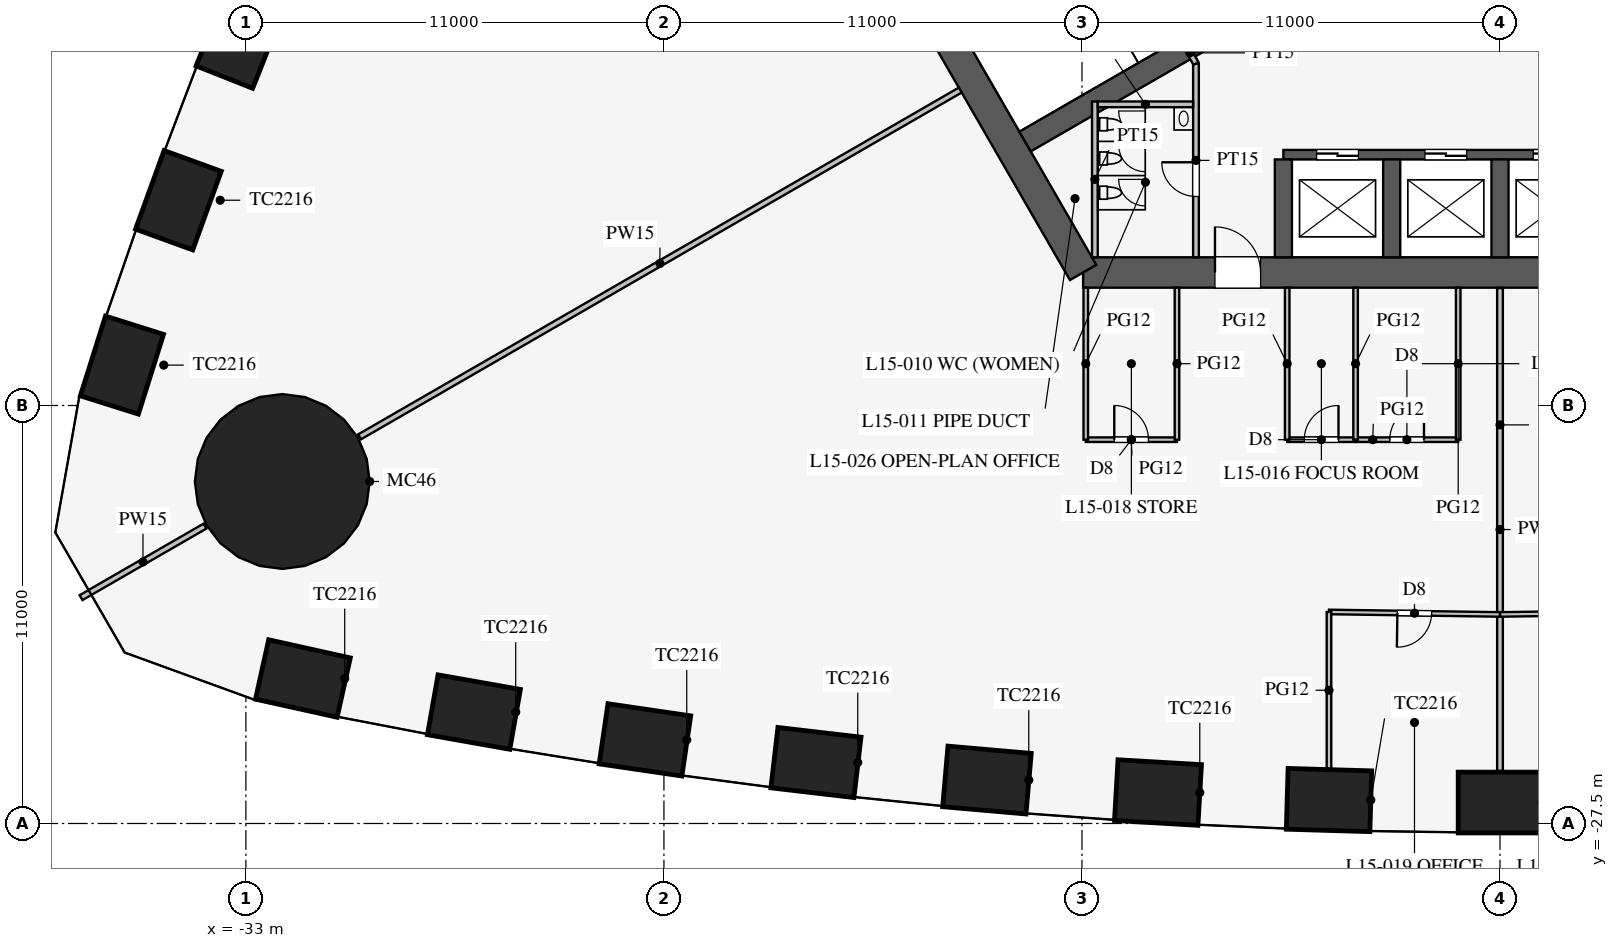
"""IFC4 building model, lengths in metres.
Left out: names, types, materials, properties, quantities, classifications, styles, units other than length and angle.
Written with IfcOpenShell. Run it as: python <this file> out.ifc"""

import sys

from ifc_helpers import new_model, si_unit, direction, frame, frame_2d, origin, origin_2d, place, context, subcontext, project, spatial, rectangle, circle, extrude, element, fill, save


model = new_model("IFC4")
c1 = context("Model", 3, precision=1e-05, world=origin(), true_north=direction((0.0, 1.0)))
c2 = subcontext(c1, "Body", "Model", "MODEL_VIEW")
j1 = project(units=[si_unit("LENGTHUNIT", "METRE"), si_unit("PLANEANGLEUNIT", "RADIAN")], contexts=[c1])
p1 = place(None, origin())
s1 = spatial("IfcSite", under=j1, at=p1, CompositionType="ELEMENT")
p2 = place(p1, origin())
s2 = spatial("IfcBuilding", under=s1, at=p2, CompositionType="ELEMENT")
p3 = place(p2, frame((0.0, 0.0, 66.9)))
s3 = spatial("IfcBuildingStorey", under=s2, at=p3, CompositionType="ELEMENT", Elevation=66.9)
for number, where, z_axis, x_axis in (
    (1, (-31.5, -23.685, 0.0), (0.0, 0.0, 1.0), (0.976, -0.217, 0.0)),
    (2, (-27.0, -24.568, 0.0), (0.0, 0.0, 1.0), (0.985, -0.174, 0.0)),
    (3, (-22.5, -25.299, 0.0), (0.0, 0.0, 1.0), (0.989, -0.145, 0.0)),
    (4, (-18.0, -25.895, 0.0), (0.0, 0.0, 1.0), (0.993, -0.116, 0.0)),
    (5, (-13.5, -26.357, 0.0), (0.0, 0.0, 1.0), (0.996, -0.087, 0.0)),
    (6, (-9.0, -26.686, 0.0), (0.0, 0.0, 1.0), (0.998, -0.058, 0.0)),
    (7, (-4.5, -26.883, 0.0), (0.0, 0.0, 1.0), (1.0, -0.029, 0.0)),
    (8, (0.0, -26.949, 0.0), (0.0, 0.0, 1.0), (1.0, 0.0, 0.0)),
    (9, (-33.16, -6.836, 0.0), (0.0, 0.0, 1.0), (-0.369, -0.929, 0.0)),
    (10, (-34.776, -11.099, 0.0), (0.0, 0.0, 1.0), (-0.342, -0.94, 0.0)),
    (11, (-36.262, -15.438, 0.0), (0.0, 0.0, 1.0), (-0.3, -0.954, 0.0)),
):
    element("IfcColumn", number, at=place(p3, frame(where, z_axis=z_axis, x_axis=x_axis)), inside=s3, PredefinedType="COLUMN", context=c2, shape_type="SweptSolid", body=[
        extrude(rectangle(XDim=2.2, YDim=1.6, at=origin_2d()), origin(), (0.0, 0.0, 1.0), 4.2),
    ])
p4 = place(p3, frame((-32.043, -18.5, 0.0), z_axis=(0.0, 0.0, 1.0), x_axis=(1.0, 0.0, 0.0)))
e12 = element("IfcColumn", 12, at=p4, inside=s3, PredefinedType="COLUMN", context=c2, shape_type="SweptSolid", body=[
    extrude(circle(Radius=2.3, at=origin_2d()), origin(), (0.0, 0.0, 1.0), 4.2),
])
p5 = place(p3, frame((-10.97, -13.0, 0.0), z_axis=(0.0, 0.0, 1.0), x_axis=(1.0, 0.0, 0.0)))
e13 = element("IfcWall", 13, at=p5, inside=s3, PredefinedType="SHEAR", context=c2, shape_type="SweptSolid", body=[
    extrude(rectangle(XDim=21.939, YDim=0.8, at=frame_2d((10.97, 0.0))), origin(), (0.0, 0.0, 1.0), 4.2),
])
p6 = place(p5, frame((17.27, 0.0, 0.0)))
e14 = element("IfcOpeningElement", 14, at=p6, cuts=e13, PredefinedType="OPENING", context=c2, shape_type="SweptSolid", body=[
    extrude(rectangle(XDim=1.2, YDim=2.1, at=frame_2d((0.6, 1.05))), frame((0.0, 0.41, 0.0), z_axis=(0.0, -1.0, 0.0), x_axis=(1.0, 0.0, 0.0)), (0.0, 0.0, 1.0), 0.82),
])
p7 = place(p5, frame((3.47, 0.0, 0.0)))
e15 = element("IfcOpeningElement", 15, at=p7, cuts=e13, PredefinedType="OPENING", context=c2, shape_type="SweptSolid", body=[
    extrude(rectangle(XDim=1.2, YDim=2.1, at=frame_2d((0.6, 1.05))), frame((0.0, 0.41, 0.0), z_axis=(0.0, -1.0, 0.0), x_axis=(1.0, 0.0, 0.0)), (0.0, 0.0, 1.0), 0.82),
])
p8 = place(p3, frame((-16.743, -3.0, 0.0), z_axis=(0.0, 0.0, 1.0), x_axis=(0.499995765644, -0.866027848477, 0.0)))
e16 = element("IfcWall", 16, at=p8, inside=s3, PredefinedType="SHEAR", context=c2, shape_type="SweptSolid", body=[
    extrude(rectangle(XDim=11.547, YDim=0.8, at=frame_2d((5.773, 0.0))), origin(), (0.0, 0.0, 1.0), 4.2),
])
p9 = place(p3, frame((-5.7, -9.9, 0.0), z_axis=(0.0, 0.0, 1.0), x_axis=(1.0, 0.0, 0.0)))
e17 = element("IfcWall", 17, at=p9, inside=s3, PredefinedType="SHEAR", context=c2, shape_type="SweptSolid", body=[
    extrude(rectangle(XDim=11.4, YDim=0.25, at=frame_2d((5.7, 0.0))), origin(), (0.0, 0.0, 1.0), 4.2),
])
p10 = place(p9, frame((0.875, 0.0, 0.0)))
e18 = element("IfcOpeningElement", 18, at=p10, cuts=e17, PredefinedType="OPENING", context=c2, shape_type="SweptSolid", body=[
    extrude(rectangle(XDim=1.1, YDim=2.2, at=frame_2d((0.55, 1.1))), frame((0.0, 0.135, 0.0), z_axis=(0.0, -1.0, 0.0), x_axis=(1.0, 0.0, 0.0)), (0.0, 0.0, 1.0), 0.27),
])
p11 = place(p9, frame((3.725, 0.0, 0.0)))
e19 = element("IfcOpeningElement", 19, at=p11, cuts=e17, PredefinedType="OPENING", context=c2, shape_type="SweptSolid", body=[
    extrude(rectangle(XDim=1.1, YDim=2.2, at=frame_2d((0.55, 1.1))), frame((0.0, 0.135, 0.0), z_axis=(0.0, -1.0, 0.0), x_axis=(1.0, 0.0, 0.0)), (0.0, 0.0, 1.0), 0.27),
])
p12 = place(p9, frame((6.575, 0.0, 0.0)))
e20 = element("IfcOpeningElement", 20, at=p12, cuts=e17, PredefinedType="OPENING", context=c2, shape_type="SweptSolid", body=[
    extrude(rectangle(XDim=1.1, YDim=2.2, at=frame_2d((0.55, 1.1))), frame((0.0, 0.135, 0.0), z_axis=(0.0, -1.0, 0.0), x_axis=(1.0, 0.0, 0.0)), (0.0, 0.0, 1.0), 0.27),
])
p13 = place(p9, frame((9.425, 0.0, 0.0)))
e21 = element("IfcOpeningElement", 21, at=p13, cuts=e17, PredefinedType="OPENING", context=c2, shape_type="SweptSolid", body=[
    extrude(rectangle(XDim=1.1, YDim=2.2, at=frame_2d((0.55, 1.1))), frame((0.0, 0.135, 0.0), z_axis=(0.0, -1.0, 0.0), x_axis=(1.0, 0.0, 0.0)), (0.0, 0.0, 1.0), 0.27),
])
for number, where, z_axis, x_axis in (
    (22, (-5.7, -10.025, 0.0), (0.0, 0.0, 1.0), (0.0, -1.0, 0.0)),
    (23, (-2.85, -10.025, 0.0), (0.0, 0.0, 1.0), (0.0, -1.0, 0.0)),
    (24, (0.0, -10.025, 0.0), (0.0, 0.0, 1.0), (0.0, -1.0, 0.0)),
):
    element("IfcWall", number, at=place(p3, frame(where, z_axis=z_axis, x_axis=x_axis)), inside=s3, PredefinedType="SHEAR", context=c2, shape_type="SweptSolid", body=[
        extrude(rectangle(XDim=2.575, YDim=0.45, at=frame_2d((1.288, 0.0))), origin(), (0.0, 0.0, 1.0), 4.2),
    ])
p14 = place(p3, frame((-4.638, -5.016, 0.0), z_axis=(0.0, 0.0, 1.0), x_axis=(-0.866019375473, -0.500010441196, 0.0)))
e25 = element("IfcWall", 25, at=p14, inside=s3, PredefinedType="SHEAR", context=c2, shape_type="SweptSolid", body=[
    extrude(rectangle(XDim=9.075, YDim=0.6, at=frame_2d((4.538, 0.0))), origin(), (0.0, 0.0, 1.0), 4.2),
])
p15 = place(p3, frame((-8.0, -7.5, 0.0), z_axis=(0.0, 0.0, 1.0), x_axis=(0.0, -1.0, 0.0)))
e26 = element("IfcWall", 26, at=p15, inside=s3, PredefinedType="PARTITIONING", context=c2, shape_type="SweptSolid", body=[
    extrude(rectangle(XDim=5.1, YDim=0.15, at=frame_2d((2.55, 0.0))), origin(), (0.0, 0.0, 1.0), 4.0),
])
p16 = place(p15, frame((2.6, 0.0, 0.0)))
e27 = element("IfcOpeningElement", 27, at=p16, cuts=e26, PredefinedType="OPENING", context=c2, shape_type="SweptSolid", body=[
    extrude(rectangle(XDim=0.9, YDim=2.1, at=frame_2d((0.45, 1.05))), frame((0.0, 0.085, 0.0), z_axis=(0.0, -1.0, 0.0), x_axis=(1.0, 0.0, 0.0)), (0.0, 0.0, 1.0), 0.17),
])
p17 = place(p3, frame((-8.0, -7.5, 0.0), z_axis=(0.0, 0.0, 1.0), x_axis=(-0.499842556608, 0.866116284689, 0.0)))
e28 = element("IfcWall", 28, at=p17, inside=s3, PredefinedType="PARTITIONING", context=c2, shape_type="SweptSolid", body=[
    extrude(rectangle(XDim=0.645, YDim=0.15, at=frame_2d((0.323, 0.0))), origin(), (0.0, 0.0, 1.0), 4.0),
])
p18 = place(p3, frame((-10.66, -8.5, 0.0), z_axis=(0.0, 0.0, 1.0), x_axis=(0.0, -1.0, 0.0)))
e29 = element("IfcWall", 29, at=p18, inside=s3, PredefinedType="PARTITIONING", context=c2, shape_type="SweptSolid", body=[
    extrude(rectangle(XDim=4.1, YDim=0.15, at=frame_2d((2.05, 0.0))), origin(), (0.0, 0.0, 1.0), 4.0),
])
p19 = place(p3, frame((-8.075, -8.575, 0.0), z_axis=(0.0, 0.0, 1.0), x_axis=(-1.0, 0.0, 0.0)))
e30 = element("IfcWall", 30, at=p19, inside=s3, PredefinedType="PARTITIONING", context=c2, shape_type="SweptSolid", body=[
    extrude(rectangle(XDim=2.51, YDim=0.15, at=frame_2d((1.255, 0.0))), origin(), (0.0, 0.0, 1.0), 4.0),
])
p20 = place(p3, frame((-14.203, -8.2, 0.0), z_axis=(0.0, 0.0, 1.0), x_axis=(-0.866024965723, -0.500000758745, 0.0)))
e31 = element("IfcWall", 31, at=p20, inside=s3, PredefinedType="PARTITIONING", context=c2, shape_type="SweptSolid", body=[
    extrude(rectangle(XDim=18.25, YDim=0.15, at=frame_2d((9.125, 0.0))), origin(), (0.0, 0.0, 1.0), 2.3),
])
p21 = place(p3, frame((-34.078, -19.675, 0.0), z_axis=(0.0, 0.0, 1.0), x_axis=(-0.866019247219, -0.500010663332, 0.0)))
e32 = element("IfcWall", 32, at=p21, inside=s3, PredefinedType="PARTITIONING", context=c2, shape_type="SweptSolid", body=[
    extrude(rectangle(XDim=3.764, YDim=0.15, at=frame_2d((1.882, 0.0))), origin(), (0.0, 0.0, 1.0), 2.3),
])
p22 = place(p3, frame((0.0, -13.41, 0.0), z_axis=(0.0, 0.0, 1.0), x_axis=(0.0, -1.0, 0.0)))
e33 = element("IfcWall", 33, at=p22, inside=s3, PredefinedType="PARTITIONING", context=c2, shape_type="SweptSolid", body=[
    extrude(rectangle(XDim=12.709, YDim=0.15, at=frame_2d((6.354, 0.0))), origin(), (0.0, 0.0, 1.0), 2.8),
])
p23 = place(p3, frame((-10.9, -17.4, 0.0), z_axis=(0.0, 0.0, 1.0), x_axis=(1.0, 0.0, 0.0)))
e34 = element("IfcWall", 34, at=p23, inside=s3, PredefinedType="PARTITIONING", context=c2, shape_type="SweptSolid", body=[
    extrude(rectangle(XDim=2.4, YDim=0.12, at=frame_2d((1.2, 0.0))), origin(), (0.0, 0.0, 1.0), 2.9),
])
p24 = place(p23, frame((0.75, 0.0, 0.15)))
e35 = element("IfcOpeningElement", 35, at=p24, cuts=e34, PredefinedType="OPENING", context=c2, shape_type="SweptSolid", body=[
    extrude(rectangle(XDim=0.9, YDim=2.1, at=frame_2d((0.45, 1.05))), frame((0.0, 0.07, 0.0), z_axis=(0.0, -1.0, 0.0), x_axis=(1.0, 0.0, 0.0)), (0.0, 0.0, 1.0), 0.14),
])
p25 = place(p3, frame((-3.8, -17.4, 0.0), z_axis=(0.0, 0.0, 1.0), x_axis=(1.0, 0.0, 0.0)))
e36 = element("IfcWall", 36, at=p25, inside=s3, PredefinedType="PARTITIONING", context=c2, shape_type="SweptSolid", body=[
    extrude(rectangle(XDim=2.7, YDim=0.12, at=frame_2d((1.35, 0.0))), origin(), (0.0, 0.0, 1.0), 2.9),
])
p26 = place(p25, frame((0.9, 0.0, 0.15)))
e37 = element("IfcOpeningElement", 37, at=p26, cuts=e36, PredefinedType="OPENING", context=c2, shape_type="SweptSolid", body=[
    extrude(rectangle(XDim=0.9, YDim=2.1, at=frame_2d((0.45, 1.05))), frame((0.0, 0.07, 0.0), z_axis=(0.0, -1.0, 0.0), x_axis=(1.0, 0.0, 0.0)), (0.0, 0.0, 1.0), 0.14),
])
p27 = place(p3, frame((-5.6, -17.4, 0.0), z_axis=(0.0, 0.0, 1.0), x_axis=(1.0, 0.0, 0.0)))
e38 = element("IfcWall", 38, at=p27, inside=s3, PredefinedType="PARTITIONING", context=c2, shape_type="SweptSolid", body=[
    extrude(rectangle(XDim=1.8, YDim=0.12, at=frame_2d((0.9, 0.0))), origin(), (0.0, 0.0, 1.0), 2.9),
])
p28 = place(p27, frame((0.45, 0.0, 0.15)))
e39 = element("IfcOpeningElement", 39, at=p28, cuts=e38, PredefinedType="OPENING", context=c2, shape_type="SweptSolid", body=[
    extrude(rectangle(XDim=0.9, YDim=2.1, at=frame_2d((0.45, 1.05))), frame((0.0, 0.07, 0.0), z_axis=(0.0, -1.0, 0.0), x_axis=(1.0, 0.0, 0.0)), (0.0, 0.0, 1.0), 0.14),
])
for number, where, z_axis, x_axis in (
    (40, (-1.1, -13.4, 0.0), (0.0, 0.0, 1.0), (0.0, -1.0, 0.0)),
    (41, (-10.9, -13.4, 0.0), (0.0, 0.0, 1.0), (0.0, -1.0, 0.0)),
    (42, (-3.8, -13.4, 0.0), (0.0, 0.0, 1.0), (0.0, -1.0, 0.0)),
    (43, (-5.6, -13.4, 0.0), (0.0, 0.0, 1.0), (0.0, -1.0, 0.0)),
    (44, (-8.5, -13.4, 0.0), (0.0, 0.0, 1.0), (0.0, -1.0, 0.0)),
):
    element("IfcWall", number, at=place(p3, frame(where, z_axis=z_axis, x_axis=x_axis)), inside=s3, PredefinedType="PARTITIONING", context=c2, shape_type="SweptSolid", body=[
        extrude(rectangle(XDim=4.0, YDim=0.12, at=frame_2d((2.0, 0.0))), origin(), (0.0, 0.0, 1.0), 2.9),
    ])
p29 = place(p3, frame((0.0, -21.999, 0.0), z_axis=(0.0, 0.0, 1.0), x_axis=(0.999894311967, 0.014538393859, 0.0)))
e45 = element("IfcWall", 45, at=p29, inside=s3, PredefinedType="PARTITIONING", context=c2, shape_type="SweptSolid", body=[
    extrude(rectangle(XDim=4.5, YDim=0.12, at=frame_2d((2.25, 0.0))), origin(), (0.0, 0.0, 1.0), 2.9),
])
p30 = place(p29, frame((1.8, 0.0, 0.15)))
e46 = element("IfcOpeningElement", 46, at=p30, cuts=e45, PredefinedType="OPENING", context=c2, shape_type="SweptSolid", body=[
    extrude(rectangle(XDim=0.9, YDim=2.1, at=frame_2d((0.45, 1.05))), frame((0.0, 0.07, 0.0), z_axis=(0.0, -1.0, 0.0), x_axis=(1.0, 0.0, 0.0)), (0.0, 0.0, 1.0), 0.14),
])
p31 = place(p3, frame((-4.5, -21.933, 0.0), z_axis=(0.0, 0.0, 1.0), x_axis=(0.999894311967, -0.014538393859, 0.0)))
e47 = element("IfcWall", 47, at=p31, inside=s3, PredefinedType="PARTITIONING", context=c2, shape_type="SweptSolid", body=[
    extrude(rectangle(XDim=4.5, YDim=0.12, at=frame_2d((2.25, 0.0))), origin(), (0.0, 0.0, 1.0), 2.9),
])
p32 = place(p31, frame((1.8, 0.0, 0.15)))
e48 = element("IfcOpeningElement", 48, at=p32, cuts=e47, PredefinedType="OPENING", context=c2, shape_type="SweptSolid", body=[
    extrude(rectangle(XDim=0.9, YDim=2.1, at=frame_2d((0.45, 1.05))), frame((0.0, 0.07, 0.0), z_axis=(0.0, -1.0, 0.0), x_axis=(1.0, 0.0, 0.0)), (0.0, 0.0, 1.0), 0.14),
])
p33 = place(p3, frame((-4.5, -21.933, 0.0), z_axis=(0.0, 0.0, 1.0), x_axis=(0.0, -1.0, 0.0)))
e49 = element("IfcWall", 49, at=p33, inside=s3, PredefinedType="PARTITIONING", context=c2, shape_type="SweptSolid", body=[
    extrude(rectangle(XDim=4.119, YDim=0.12, at=frame_2d((2.06, 0.0))), origin(), (0.0, 0.0, 1.0), 2.8),
])
p34 = place(p3, frame((26.415, -15.231, 0.0), z_axis=(0.0, 0.0, 1.0), x_axis=(-0.50000091641, 0.866024874695, 0.0)))
e50 = element("IfcWall", 50, at=p34, inside=s3, PredefinedType="PARTITIONING", context=c2, shape_type="SweptSolid", body=[
    extrude(rectangle(XDim=52.796, YDim=0.12, at=frame_2d((26.398, 0.0))), origin(), (0.0, 0.0, 1.0), 2.9),
])
p35 = place(p34, frame((10.2, 0.0, 0.15)))
e51 = element("IfcOpeningElement", 51, at=p35, cuts=e50, PredefinedType="OPENING", context=c2, shape_type="SweptSolid", body=[
    extrude(rectangle(XDim=1.8, YDim=2.1, at=frame_2d((0.9, 1.05))), frame((0.0, 0.07, 0.0), z_axis=(0.0, -1.0, 0.0), x_axis=(1.0, 0.0, 0.0)), (0.0, 0.0, 1.0), 0.14),
])
p36 = place(p34, frame((40.8, 0.0, 0.15)))
e52 = element("IfcOpeningElement", 52, at=p36, cuts=e50, PredefinedType="OPENING", context=c2, shape_type="SweptSolid", body=[
    extrude(rectangle(XDim=1.8, YDim=2.1, at=frame_2d((0.9, 1.05))), frame((0.0, 0.07, 0.0), z_axis=(0.0, -1.0, 0.0), x_axis=(1.0, 0.0, 0.0)), (0.0, 0.0, 1.0), 0.14),
])
p37 = place(p16, frame((0.9, 0.0, 0.0), z_axis=(0.0, 0.0, 1.0), x_axis=(-1.0, 0.0, 0.0)))
e53 = element("IfcDoor", 53, at=p37, inside=s3, OperationType="SINGLE_SWING_RIGHT", PredefinedType="DOOR", context=c2, shape_type="SweptSolid", body=[
    extrude(rectangle(XDim=0.9, YDim=2.1, at=frame_2d((0.45, 1.05))), frame((0.0, 0.025, 0.0), z_axis=(0.0, -1.0, 0.0), x_axis=(1.0, 0.0, 0.0)), (0.0, 0.0, 1.0), 0.05),
])
fill(e27, e53)
p38 = place(p7, origin())
e54 = element("IfcDoor", 54, at=p38, inside=s3, OperationType="SINGLE_SWING_LEFT", PredefinedType="DOOR", context=c2, shape_type="SweptSolid", body=[
    extrude(rectangle(XDim=1.2, YDim=2.1, at=frame_2d((0.6, 1.05))), frame((0.0, 0.025, 0.0), z_axis=(0.0, -1.0, 0.0), x_axis=(1.0, 0.0, 0.0)), (0.0, 0.0, 1.0), 0.05),
])
fill(e15, e54)
p39 = place(p28, origin())
e55 = element("IfcDoor", 55, at=p39, inside=s3, OperationType="SINGLE_SWING_RIGHT", PredefinedType="DOOR", context=c2, shape_type="SweptSolid", body=[
    extrude(rectangle(XDim=0.9, YDim=2.1, at=frame_2d((0.45, 1.05))), frame((0.0, 0.025, 0.0), z_axis=(0.0, -1.0, 0.0), x_axis=(1.0, 0.0, 0.0)), (0.0, 0.0, 1.0), 0.05),
])
fill(e39, e55)
p40 = place(p26, origin())
e56 = element("IfcDoor", 56, at=p40, inside=s3, OperationType="SINGLE_SWING_RIGHT", PredefinedType="DOOR", context=c2, shape_type="SweptSolid", body=[
    extrude(rectangle(XDim=0.9, YDim=2.1, at=frame_2d((0.45, 1.05))), frame((0.0, 0.025, 0.0), z_axis=(0.0, -1.0, 0.0), x_axis=(1.0, 0.0, 0.0)), (0.0, 0.0, 1.0), 0.05),
])
fill(e37, e56)
p41 = place(p24, origin())
e57 = element("IfcDoor", 57, at=p41, inside=s3, OperationType="SINGLE_SWING_LEFT", PredefinedType="DOOR", context=c2, shape_type="SweptSolid", body=[
    extrude(rectangle(XDim=0.9, YDim=2.1, at=frame_2d((0.45, 1.05))), frame((0.0, 0.025, 0.0), z_axis=(0.0, -1.0, 0.0), x_axis=(1.0, 0.0, 0.0)), (0.0, 0.0, 1.0), 0.05),
])
fill(e35, e57)
p42 = place(p32, frame((0.9, 0.0, 0.0), z_axis=(0.0, 0.0, 1.0), x_axis=(-1.0, 0.0, 0.0)))
e58 = element("IfcDoor", 58, at=p42, inside=s3, OperationType="SINGLE_SWING_RIGHT", PredefinedType="DOOR", context=c2, shape_type="SweptSolid", body=[
    extrude(rectangle(XDim=0.9, YDim=2.1, at=frame_2d((0.45, 1.05))), frame((0.0, 0.025, 0.0), z_axis=(0.0, -1.0, 0.0), x_axis=(1.0, 0.0, 0.0)), (0.0, 0.0, 1.0), 0.05),
])
fill(e48, e58)
p43 = place(p10, origin())
e59 = element("IfcDoor", 59, at=p43, inside=s3, OperationType="DOUBLE_DOOR_SLIDING", PredefinedType="DOOR", context=c2, shape_type="SweptSolid", body=[
    extrude(rectangle(XDim=1.1, YDim=2.2, at=frame_2d((0.55, 1.1))), frame((0.0, 0.025, 0.0), z_axis=(0.0, -1.0, 0.0), x_axis=(1.0, 0.0, 0.0)), (0.0, 0.0, 1.0), 0.05),
])
fill(e18, e59)
p44 = place(p11, origin())
e60 = element("IfcDoor", 60, at=p44, inside=s3, OperationType="DOUBLE_DOOR_SLIDING", PredefinedType="DOOR", context=c2, shape_type="SweptSolid", body=[
    extrude(rectangle(XDim=1.1, YDim=2.2, at=frame_2d((0.55, 1.1))), frame((0.0, 0.025, 0.0), z_axis=(0.0, -1.0, 0.0), x_axis=(1.0, 0.0, 0.0)), (0.0, 0.0, 1.0), 0.05),
])
fill(e19, e60)
p45 = place(p12, origin())
e61 = element("IfcDoor", 61, at=p45, inside=s3, OperationType="DOUBLE_DOOR_SLIDING", PredefinedType="DOOR", context=c2, shape_type="SweptSolid", body=[
    extrude(rectangle(XDim=1.1, YDim=2.2, at=frame_2d((0.55, 1.1))), frame((0.0, 0.025, 0.0), z_axis=(0.0, -1.0, 0.0), x_axis=(1.0, 0.0, 0.0)), (0.0, 0.0, 1.0), 0.05),
])
fill(e20, e61)
save(model, sys.argv[1])
